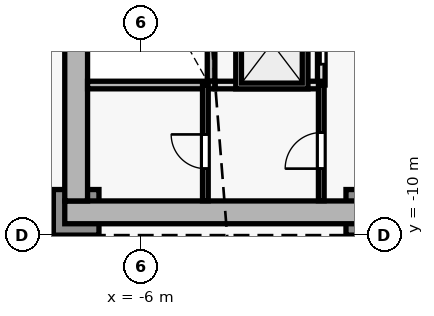
"""IFC4 building model, lengths in metres.
Left out: names, types, materials, properties, quantities, classifications, styles, units other than length and angle.
Written with IfcOpenShell. Run it as: python <this file> out.ifc"""

import sys

from ifc_helpers import new_model, si_unit, direction, frame, frame_2d, origin, origin_2d, place, context, subcontext, project, spatial, rectangle, extrude, element, fill, save


model = new_model("IFC4")
c1 = context("Model", 3, precision=1e-05, world=origin(), true_north=direction((0.0, 1.0)))
c2 = subcontext(c1, "Body", "Model", "MODEL_VIEW")
j1 = project(units=[si_unit("LENGTHUNIT", "METRE"), si_unit("PLANEANGLEUNIT", "RADIAN")], contexts=[c1])
p1 = place(None, origin())
s1 = spatial("IfcSite", under=j1, at=p1, CompositionType="ELEMENT")
p2 = place(p1, origin())
s2 = spatial("IfcBuilding", under=s1, at=p2, CompositionType="ELEMENT")
p3 = place(p2, origin())
s3 = spatial("IfcBuildingStorey", under=s2, at=p3, CompositionType="ELEMENT", Elevation=0.0)
for number, where, z_axis, x_axis in (
    (1, (-7.7, -9.4, 0.0), (0.0, 0.0, 1.0), (1.0, 0.0, 0.0)),
    (2, (0.0, -9.4, 0.0), (0.0, 0.0, 1.0), (1.0, 0.0, 0.0)),
):
    element("IfcColumn", number, at=place(p3, frame(where, z_axis=z_axis, x_axis=x_axis)), inside=s3, PredefinedType="COLUMN", context=c2, shape_type="SweptSolid", body=[
        extrude(rectangle(XDim=1.2, YDim=1.2, at=origin_2d()), origin(), (0.0, 0.0, 1.0), 5.0),
    ])
p4 = place(p3, frame((-8.0, -9.4, 0.0), z_axis=(0.0, 0.0, 1.0), x_axis=(1.0, 0.0, 0.0)))
e3 = element("IfcWall", 3, at=p4, inside=s3, PredefinedType="SHEAR", context=c2, shape_type="SweptSolid", body=[
    extrude(rectangle(XDim=16.0, YDim=0.6, at=frame_2d((8.0, 0.0))), origin(), (0.0, 0.0, 1.0), 4.72),
])
p5 = place(p4, frame((9.65, 0.0, 0.0)))
e4 = element("IfcOpeningElement", 4, at=p5, cuts=e3, PredefinedType="OPENING", context=c2, shape_type="SweptSolid", body=[
    extrude(rectangle(XDim=1.5, YDim=2.2, at=frame_2d((0.75, 1.1))), frame((0.0, 0.31, 0.0), z_axis=(0.0, -1.0, 0.0), x_axis=(1.0, 0.0, 0.0)), (0.0, 0.0, 1.0), 0.62),
])
p6 = place(p3, frame((-7.7, -9.1, 0.0), z_axis=(0.0, 0.0, 1.0), x_axis=(0.0, 1.0, 0.0)))
e5 = element("IfcWall", 5, at=p6, inside=s3, PredefinedType="SHEAR", context=c2, shape_type="SweptSolid", body=[
    extrude(rectangle(XDim=19.0, YDim=0.6, at=frame_2d((9.5, 0.0))), origin(), (0.0, 0.0, 1.0), 4.72),
])
p7 = place(p6, frame((12.65, 0.0, 0.0)))
e6 = element("IfcOpeningElement", 6, at=p7, cuts=e5, PredefinedType="OPENING", context=c2, shape_type="SweptSolid", body=[
    extrude(rectangle(XDim=1.1, YDim=2.15, at=frame_2d((0.55, 1.075))), frame((0.0, 0.31, 0.0), z_axis=(0.0, -1.0, 0.0), x_axis=(1.0, 0.0, 0.0)), (0.0, 0.0, 1.0), 0.62),
])
p8 = place(p6, frame((9.1, 0.0, 0.0)))
e7 = element("IfcOpeningElement", 7, at=p8, cuts=e5, PredefinedType="OPENING", context=c2, shape_type="SweptSolid", body=[
    extrude(rectangle(XDim=1.0, YDim=2.15, at=frame_2d((0.5, 1.075))), frame((0.0, 0.31, 0.0), z_axis=(0.0, -1.0, 0.0), x_axis=(1.0, 0.0, 0.0)), (0.0, 0.0, 1.0), 0.62),
])
p9 = place(p3, frame((-4.15, -5.95, 0.0), z_axis=(0.0, 0.0, 1.0), x_axis=(0.0, 1.0, 0.0)))
e8 = element("IfcWall", 8, at=p9, inside=s3, PredefinedType="SOLIDWALL", context=c2, shape_type="SweptSolid", body=[
    extrude(rectangle(XDim=7.2, YDim=0.2, at=frame_2d((3.6, 0.0))), origin(), (0.0, 0.0, 1.0), 4.72),
])
p10 = place(p3, frame((-1.25, -6.05, 0.0), z_axis=(0.0, 0.0, 1.0), x_axis=(0.0, 1.0, 0.0)))
e9 = element("IfcWall", 9, at=p10, inside=s3, PredefinedType="SOLIDWALL", context=c2, shape_type="SweptSolid", body=[
    extrude(rectangle(XDim=8.7, YDim=0.2, at=frame_2d((4.35, 0.0))), origin(), (0.0, 0.0, 1.0), 4.72),
])
p11 = place(p10, frame((0.55, 0.0, 0.0)))
e10 = element("IfcOpeningElement", 10, at=p11, cuts=e9, PredefinedType="OPENING", context=c2, shape_type="SweptSolid", body=[
    extrude(rectangle(XDim=1.1, YDim=2.15, at=frame_2d((0.55, 1.075))), frame((0.0, 0.11, 0.0), z_axis=(0.0, -1.0, 0.0), x_axis=(1.0, 0.0, 0.0)), (0.0, 0.0, 1.0), 0.22),
])
p12 = place(p10, frame((2.65, 0.0, 0.0)))
e11 = element("IfcOpeningElement", 11, at=p12, cuts=e9, PredefinedType="OPENING", context=c2, shape_type="SweptSolid", body=[
    extrude(rectangle(XDim=1.1, YDim=2.15, at=frame_2d((0.55, 1.075))), frame((0.0, 0.11, 0.0), z_axis=(0.0, -1.0, 0.0), x_axis=(1.0, 0.0, 0.0)), (0.0, 0.0, 1.0), 0.22),
])
p13 = place(p10, frame((4.75, 0.0, 0.0)))
e12 = element("IfcOpeningElement", 12, at=p13, cuts=e9, PredefinedType="OPENING", context=c2, shape_type="SweptSolid", body=[
    extrude(rectangle(XDim=1.1, YDim=2.15, at=frame_2d((0.55, 1.075))), frame((0.0, 0.11, 0.0), z_axis=(0.0, -1.0, 0.0), x_axis=(1.0, 0.0, 0.0)), (0.0, 0.0, 1.0), 0.22),
])
p14 = place(p10, frame((6.85, 0.0, 0.0)))
e13 = element("IfcOpeningElement", 13, at=p14, cuts=e9, PredefinedType="OPENING", context=c2, shape_type="SweptSolid", body=[
    extrude(rectangle(XDim=1.1, YDim=2.15, at=frame_2d((0.55, 1.075))), frame((0.0, 0.11, 0.0), z_axis=(0.0, -1.0, 0.0), x_axis=(1.0, 0.0, 0.0)), (0.0, 0.0, 1.0), 0.22),
])
p15 = place(p3, frame((-7.4, -6.05, 0.0), z_axis=(0.0, 0.0, 1.0), x_axis=(1.0, 0.0, 0.0)))
e14 = element("IfcWall", 14, at=p15, inside=s3, PredefinedType="SOLIDWALL", context=c2, shape_type="SweptSolid", body=[
    extrude(rectangle(XDim=3.35, YDim=0.2, at=frame_2d((1.675, 0.0))), origin(), (0.0, 0.0, 1.0), 4.72),
])
p16 = place(p3, frame((-4.04, -6.05, 0.0), z_axis=(0.0, 0.0, 1.0), x_axis=(1.0, 0.0, 0.0)))
e15 = element("IfcWall", 15, at=p16, inside=s3, PredefinedType="SOLIDWALL", context=c2, shape_type="SweptSolid", body=[
    extrude(rectangle(XDim=2.79, YDim=0.2, at=frame_2d((1.395, 0.0))), origin(), (0.0, 0.0, 1.0), 4.72),
])
p17 = place(p3, frame((-1.25, -9.095, 0.0), z_axis=(0.0, 0.0, 1.0), x_axis=(0.0, 1.0, 0.0)))
e16 = element("IfcWall", 16, at=p17, inside=s3, PredefinedType="PARTITIONING", context=c2, shape_type="SweptSolid", body=[
    extrude(rectangle(XDim=3.045, YDim=0.15, at=frame_2d((1.522, 0.0))), origin(), (0.0, 0.0, 1.0), 4.72),
])
p18 = place(p17, frame((0.845, 0.0, 0.0)))
e17 = element("IfcOpeningElement", 17, at=p18, cuts=e16, PredefinedType="OPENING", context=c2, shape_type="SweptSolid", body=[
    extrude(rectangle(XDim=0.95, YDim=2.1, at=frame_2d((0.475, 1.05))), frame((0.0, 0.085, 0.0), z_axis=(0.0, -1.0, 0.0), x_axis=(1.0, 0.0, 0.0)), (0.0, 0.0, 1.0), 0.17),
])
p19 = place(p3, frame((-4.3, -9.095, 0.0), z_axis=(0.0, 0.0, 1.0), x_axis=(0.0, 1.0, 0.0)))
e18 = element("IfcWall", 18, at=p19, inside=s3, PredefinedType="PARTITIONING", context=c2, shape_type="SweptSolid", body=[
    extrude(rectangle(XDim=3.045, YDim=0.15, at=frame_2d((1.522, 0.0))), origin(), (0.0, 0.0, 1.0), 4.72),
])
p20 = place(p19, frame((0.845, 0.0, 0.0)))
e19 = element("IfcOpeningElement", 19, at=p20, cuts=e18, PredefinedType="OPENING", context=c2, shape_type="SweptSolid", body=[
    extrude(rectangle(XDim=0.9, YDim=2.1, at=frame_2d((0.45, 1.05))), frame((0.0, 0.085, 0.0), z_axis=(0.0, -1.0, 0.0), x_axis=(1.0, 0.0, 0.0)), (0.0, 0.0, 1.0), 0.17),
])
p21 = place(p11, origin())
e20 = element("IfcDoor", 20, at=p21, inside=s3, OperationType="DOUBLE_DOOR_SLIDING", PredefinedType="DOOR", context=c2, shape_type="SweptSolid", body=[
    extrude(rectangle(XDim=1.1, YDim=2.15, at=frame_2d((0.55, 1.075))), frame((0.0, 0.025, 0.0), z_axis=(0.0, -1.0, 0.0), x_axis=(1.0, 0.0, 0.0)), (0.0, 0.0, 1.0), 0.05),
])
fill(e10, e20)
p22 = place(p18, origin())
e21 = element("IfcDoor", 21, at=p22, inside=s3, OperationType="SINGLE_SWING_LEFT", PredefinedType="DOOR", context=c2, shape_type="SweptSolid", body=[
    extrude(rectangle(XDim=0.95, YDim=2.1, at=frame_2d((0.475, 1.05))), frame((0.0, 0.025, 0.0), z_axis=(0.0, -1.0, 0.0), x_axis=(1.0, 0.0, 0.0)), (0.0, 0.0, 1.0), 0.05),
])
fill(e17, e21)
p23 = place(p20, origin())
e22 = element("IfcDoor", 22, at=p23, inside=s3, OperationType="SINGLE_SWING_RIGHT", PredefinedType="DOOR", context=c2, shape_type="SweptSolid", body=[
    extrude(rectangle(XDim=0.9, YDim=2.1, at=frame_2d((0.45, 1.05))), frame((0.0, 0.025, 0.0), z_axis=(0.0, -1.0, 0.0), x_axis=(1.0, 0.0, 0.0)), (0.0, 0.0, 1.0), 0.05),
])
fill(e19, e22)
save(model, sys.argv[1])
